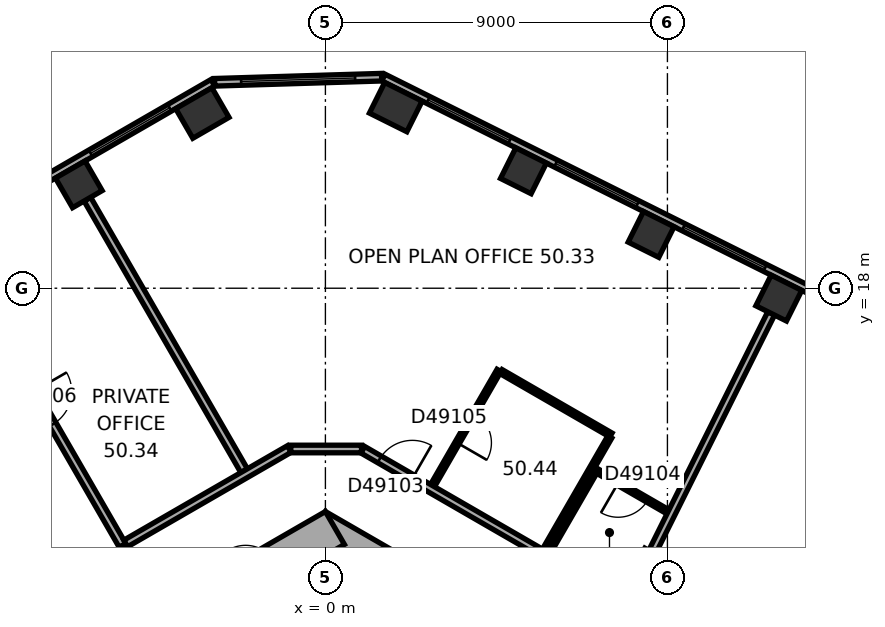
"""IFC4 building model, lengths in metres.
Left out: names, types, materials, properties, quantities, classifications, styles, units other than length and angle.
Written with IfcOpenShell. Run it as: python <this file> out.ifc"""

import sys

from ifc_helpers import new_model, si_unit, direction, frame, frame_2d, origin, origin_2d, place, context, subcontext, project, spatial, rectangle, extrude, element, fill, save


model = new_model("IFC4")
c1 = context("Model", 3, precision=1e-05, world=origin(), true_north=direction((0.0, 1.0)))
c2 = subcontext(c1, "Body", "Model", "MODEL_VIEW")
j1 = project(units=[si_unit("LENGTHUNIT", "METRE"), si_unit("PLANEANGLEUNIT", "RADIAN")], contexts=[c1])
p1 = place(None, origin())
s1 = spatial("IfcSite", under=j1, at=p1, CompositionType="ELEMENT")
p2 = place(p1, origin())
s2 = spatial("IfcBuilding", under=s1, at=p2, CompositionType="ELEMENT")
p3 = place(p2, frame((0.0, 0.0, 202.1)))
s3 = spatial("IfcBuildingStorey", under=s2, at=p3, CompositionType="ELEMENT", Elevation=202.1)
for number, where, z_axis, x_axis in (
    (1, (11.931, 17.74, 0.0), (0.0, 0.0, 1.0), (-0.895, 0.446, 0.0)),
    (2, (8.571, 19.416, 0.0), (0.0, 0.0, 1.0), (-0.895, 0.446, 0.0)),
    (3, (5.211, 21.091, 0.0), (0.0, 0.0, 1.0), (-0.895, 0.446, 0.0)),
):
    element("IfcColumn", number, at=place(p3, frame(where, z_axis=z_axis, x_axis=x_axis)), inside=s3, PredefinedType="COLUMN", context=c2, shape_type="SweptSolid", body=[
        extrude(rectangle(XDim=0.9, YDim=0.9, at=origin_2d()), origin(), (0.0, 0.0, 1.0), 3.7),
    ])
for number, where, z_axis, x_axis in (
    (4, (1.852, 22.766, 0.0), (0.0, 0.0, 1.0), (-0.895, 0.446, 0.0)),
    (5, (-3.238, 22.61, 0.0), (0.0, 0.0, 1.0), (-0.866, -0.5, 0.0)),
):
    element("IfcColumn", number, at=place(p3, frame(where, z_axis=z_axis, x_axis=x_axis)), inside=s3, PredefinedType="COLUMN", context=c2, shape_type="SweptSolid", body=[
        extrude(rectangle(XDim=1.1, YDim=0.9, at=origin_2d()), origin(), (0.0, 0.0, 1.0), 3.7),
    ])
p4 = place(p3, frame((-6.489, 20.733, 0.0), z_axis=(0.0, 0.0, 1.0), x_axis=(-0.866025403784, -0.5, 0.0)))
e6 = element("IfcColumn", 6, at=p4, inside=s3, PredefinedType="COLUMN", context=c2, shape_type="SweptSolid", body=[
    extrude(rectangle(XDim=0.9, YDim=0.9, at=origin_2d()), origin(), (0.0, 0.0, 1.0), 3.7),
])
p5 = place(p3, frame((10.25, 5.629, 0.0), z_axis=(0.0, 0.0, 1.0), x_axis=(-0.866022616891, 0.50000482701, 0.0)))
e7 = element("IfcWall", 7, at=p5, inside=s3, PredefinedType="SHEAR", context=c2, shape_type="SweptSolid", body=[
    extrude(rectangle(XDim=12.125, YDim=1.0, at=frame_2d((6.062, 0.0))), origin(), (0.0, 0.0, 1.0), 3.7),
])
p6 = place(p5, frame((5.312, 0.0, 0.0)))
e8 = element("IfcOpeningElement", 8, at=p6, cuts=e7, PredefinedType="OPENING", context=c2, shape_type="SweptSolid", body=[
    extrude(rectangle(XDim=0.9, YDim=2.1, at=frame_2d((0.45, 1.05))), frame((0.0, 0.51, 0.0), z_axis=(0.0, -1.0, 0.0), x_axis=(1.0, 0.0, 0.0)), (0.0, 0.0, 1.0), 1.02),
])
p7 = place(p3, frame((0.25, 11.691, 0.0), z_axis=(0.0, 0.0, 1.0), x_axis=(-0.866022616891, -0.50000482701, 0.0)))
e9 = element("IfcWall", 9, at=p7, inside=s3, PredefinedType="SHEAR", context=c2, shape_type="SweptSolid", body=[
    extrude(rectangle(XDim=12.125, YDim=1.0, at=frame_2d((6.062, 0.0))), origin(), (0.0, 0.0, 1.0), 3.7),
])
p8 = place(p7, frame((6.262, 0.0, 0.0)))
e10 = element("IfcOpeningElement", 10, at=p8, cuts=e9, PredefinedType="OPENING", context=c2, shape_type="SweptSolid", body=[
    extrude(rectangle(XDim=1.5, YDim=2.1, at=frame_2d((0.75, 1.05))), frame((0.0, 0.51, 0.0), z_axis=(0.0, -1.0, 0.0), x_axis=(1.0, 0.0, 0.0)), (0.0, 0.0, 1.0), 1.02),
])
p9 = place(p7, frame((1.812, 0.0, 0.0)))
e11 = element("IfcOpeningElement", 11, at=p9, cuts=e9, PredefinedType="OPENING", context=c2, shape_type="SweptSolid", body=[
    extrude(rectangle(XDim=0.9, YDim=2.1, at=frame_2d((0.45, 1.05))), frame((0.0, 0.51, 0.0), z_axis=(0.0, -1.0, 0.0), x_axis=(1.0, 0.0, 0.0)), (0.0, 0.0, 1.0), 1.02),
])
p10 = place(p7, frame((4.412, 0.0, 0.0)))
e12 = element("IfcOpeningElement", 12, at=p10, cuts=e9, PredefinedType="OPENING", context=c2, shape_type="SweptSolid", body=[
    extrude(rectangle(XDim=0.9, YDim=2.1, at=frame_2d((0.45, 1.05))), frame((0.0, 0.51, 0.0), z_axis=(0.0, -1.0, 0.0), x_axis=(1.0, 0.0, 0.0)), (0.0, 0.0, 1.0), 1.02),
])
p11 = place(p3, frame((19.464, 14.599, 0.0), z_axis=(0.0, 0.0, 1.0), x_axis=(-0.894935755043, 0.446195018289, 0.0)))
e13 = element("IfcWall", 13, at=p11, inside=s3, PredefinedType="STANDARD", context=c2, shape_type="SweptSolid", body=[
    extrude(rectangle(XDim=20.044, YDim=0.2, at=frame_2d((10.022, 0.0))), origin(), (0.0, 0.0, 1.0), 3.7),
])
p12 = place(p11, frame((1.313, 0.0, 0.9)))
e14 = element("IfcOpeningElement", 14, at=p12, cuts=e13, PredefinedType="OPENING", context=c2, shape_type="SweptSolid", body=[
    extrude(rectangle(XDim=2.4, YDim=2.0, at=frame_2d((1.2, 1.0))), frame((0.0, 0.11, 0.0), z_axis=(0.0, -1.0, 0.0), x_axis=(1.0, 0.0, 0.0)), (0.0, 0.0, 1.0), 0.22),
])
p13 = place(p11, frame((5.067, 0.0, 0.9)))
e15 = element("IfcOpeningElement", 15, at=p13, cuts=e13, PredefinedType="OPENING", context=c2, shape_type="SweptSolid", body=[
    extrude(rectangle(XDim=2.4, YDim=2.0, at=frame_2d((1.2, 1.0))), frame((0.0, 0.11, 0.0), z_axis=(0.0, -1.0, 0.0), x_axis=(1.0, 0.0, 0.0)), (0.0, 0.0, 1.0), 0.22),
])
p14 = place(p11, frame((8.821, 0.0, 0.9)))
e16 = element("IfcOpeningElement", 16, at=p14, cuts=e13, PredefinedType="OPENING", context=c2, shape_type="SweptSolid", body=[
    extrude(rectangle(XDim=2.4, YDim=2.0, at=frame_2d((1.2, 1.0))), frame((0.0, 0.11, 0.0), z_axis=(0.0, -1.0, 0.0), x_axis=(1.0, 0.0, 0.0)), (0.0, 0.0, 1.0), 0.22),
])
p15 = place(p11, frame((12.575, 0.0, 0.9)))
e17 = element("IfcOpeningElement", 17, at=p15, cuts=e13, PredefinedType="OPENING", context=c2, shape_type="SweptSolid", body=[
    extrude(rectangle(XDim=2.4, YDim=2.0, at=frame_2d((1.2, 1.0))), frame((0.0, 0.11, 0.0), z_axis=(0.0, -1.0, 0.0), x_axis=(1.0, 0.0, 0.0)), (0.0, 0.0, 1.0), 0.22),
])
p16 = place(p11, frame((16.329, 0.0, 0.9)))
e18 = element("IfcOpeningElement", 18, at=p16, cuts=e13, PredefinedType="OPENING", context=c2, shape_type="SweptSolid", body=[
    extrude(rectangle(XDim=2.4, YDim=2.0, at=frame_2d((1.2, 1.0))), frame((0.0, 0.11, 0.0), z_axis=(0.0, -1.0, 0.0), x_axis=(1.0, 0.0, 0.0)), (0.0, 0.0, 1.0), 0.22),
])
p17 = place(p3, frame((1.479, 23.553, 0.0), z_axis=(0.0, 0.0, 1.0), x_axis=(-0.999534786117, -0.03049936625, 0.0)))
e19 = element("IfcWall", 19, at=p17, inside=s3, PredefinedType="STANDARD", context=c2, shape_type="SweptSolid", body=[
    extrude(rectangle(XDim=4.395, YDim=0.2, at=frame_2d((2.197, 0.0))), origin(), (0.0, 0.0, 1.0), 3.7),
])
p18 = place(p17, frame((0.698, 0.0, 0.9)))
e20 = element("IfcOpeningElement", 20, at=p18, cuts=e19, PredefinedType="OPENING", context=c2, shape_type="SweptSolid", body=[
    extrude(rectangle(XDim=3.0, YDim=2.0, at=frame_2d((1.5, 1.0))), frame((0.0, 0.11, 0.0), z_axis=(0.0, -1.0, 0.0), x_axis=(1.0, 0.0, 0.0)), (0.0, 0.0, 1.0), 0.22),
])
p19 = place(p3, frame((-2.961, 23.405, 0.0), z_axis=(0.0, 0.0, 1.0), x_axis=(-0.866023315909, -0.500003616288, 0.0)))
e21 = element("IfcWall", 21, at=p19, inside=s3, PredefinedType="STANDARD", context=c2, shape_type="SweptSolid", body=[
    extrude(rectangle(XDim=20.044, YDim=0.2, at=frame_2d((10.022, 0.0))), origin(), (0.0, 0.0, 1.0), 3.7),
])
p20 = place(p19, frame((1.314, 0.0, 0.9)))
e22 = element("IfcOpeningElement", 22, at=p20, cuts=e21, PredefinedType="OPENING", context=c2, shape_type="SweptSolid", body=[
    extrude(rectangle(XDim=2.4, YDim=2.0, at=frame_2d((1.2, 1.0))), frame((0.0, 0.11, 0.0), z_axis=(0.0, -1.0, 0.0), x_axis=(1.0, 0.0, 0.0)), (0.0, 0.0, 1.0), 0.22),
])
p21 = place(p19, frame((5.069, 0.0, 0.9)))
e23 = element("IfcOpeningElement", 23, at=p21, cuts=e21, PredefinedType="OPENING", context=c2, shape_type="SweptSolid", body=[
    extrude(rectangle(XDim=2.4, YDim=2.0, at=frame_2d((1.2, 1.0))), frame((0.0, 0.11, 0.0), z_axis=(0.0, -1.0, 0.0), x_axis=(1.0, 0.0, 0.0)), (0.0, 0.0, 1.0), 0.22),
])
p22 = place(p19, frame((8.823, 0.0, 0.9)))
e24 = element("IfcOpeningElement", 24, at=p22, cuts=e21, PredefinedType="OPENING", context=c2, shape_type="SweptSolid", body=[
    extrude(rectangle(XDim=2.4, YDim=2.0, at=frame_2d((1.2, 1.0))), frame((0.0, 0.11, 0.0), z_axis=(0.0, -1.0, 0.0), x_axis=(1.0, 0.0, 0.0)), (0.0, 0.0, 1.0), 0.22),
])
p23 = place(p19, frame((12.577, 0.0, 0.9)))
e25 = element("IfcOpeningElement", 25, at=p23, cuts=e21, PredefinedType="OPENING", context=c2, shape_type="SweptSolid", body=[
    extrude(rectangle(XDim=2.4, YDim=2.0, at=frame_2d((1.2, 1.0))), frame((0.0, 0.11, 0.0), z_axis=(0.0, -1.0, 0.0), x_axis=(1.0, 0.0, 0.0)), (0.0, 0.0, 1.0), 0.22),
])
p24 = place(p19, frame((16.331, 0.0, 0.9)))
e26 = element("IfcOpeningElement", 26, at=p24, cuts=e21, PredefinedType="OPENING", context=c2, shape_type="SweptSolid", body=[
    extrude(rectangle(XDim=2.4, YDim=2.0, at=frame_2d((1.2, 1.0))), frame((0.0, 0.11, 0.0), z_axis=(0.0, -1.0, 0.0), x_axis=(1.0, 0.0, 0.0)), (0.0, 0.0, 1.0), 0.22),
])
p25 = place(p3, frame((-9.515, 18.466, 0.0), z_axis=(0.0, 0.0, 1.0), x_axis=(0.500010139422, -0.866019549707, 0.0)))
e27 = element("IfcWall", 27, at=p25, inside=s3, PredefinedType="PARTITIONING", context=c2, shape_type="SweptSolid", body=[
    extrude(rectangle(XDim=8.35, YDim=0.2, at=frame_2d((4.175, 0.0))), origin(), (0.0, 0.0, 1.0), 2.55),
])
p26 = place(p25, frame((3.675, 0.0, 0.0)))
e28 = element("IfcOpeningElement", 28, at=p26, cuts=e27, PredefinedType="OPENING", context=c2, shape_type="SweptSolid", body=[
    extrude(rectangle(XDim=1.0, YDim=2.1, at=frame_2d((0.5, 1.05))), frame((0.0, 0.11, 0.0), z_axis=(0.0, -1.0, 0.0), x_axis=(1.0, 0.0, 0.0)), (0.0, 0.0, 1.0), 0.22),
])
p27 = place(p3, frame((-6.264, 20.344, 0.0), z_axis=(0.0, 0.0, 1.0), x_axis=(0.499996545922, -0.866027397988, 0.0)))
e29 = element("IfcWall", 29, at=p27, inside=s3, PredefinedType="PARTITIONING", context=c2, shape_type="SweptSolid", body=[
    extrude(rectangle(XDim=8.25, YDim=0.2, at=frame_2d((4.125, 0.0))), origin(), (0.0, 0.0, 1.0), 3.35),
])
p28 = place(p3, frame((-0.95, 13.77, 0.0), z_axis=(0.0, 0.0, 1.0), x_axis=(-0.866036689987, -0.499980451214, 0.0)))
e30 = element("IfcWall", 30, at=p28, inside=s3, PredefinedType="PARTITIONING", context=c2, shape_type="SweptSolid", body=[
    extrude(rectangle(XDim=4.969, YDim=0.2, at=frame_2d((2.485, 0.0))), origin(), (0.0, 0.0, 1.0), 3.35),
])
p29 = place(p3, frame((0.95, 13.77, 0.0), z_axis=(0.0, 0.0, 1.0), x_axis=(-1.0, 0.0, 0.0)))
e31 = element("IfcWall", 31, at=p29, inside=s3, PredefinedType="PARTITIONING", context=c2, shape_type="SweptSolid", body=[
    extrude(rectangle(XDim=1.86, YDim=0.2, at=frame_2d((0.93, 0.0))), origin(), (0.0, 0.0, 1.0), 3.35),
])
p30 = place(p3, frame((2.819, 12.806, 0.0), z_axis=(0.0, 0.0, 1.0), x_axis=(0.500010275428, 0.866019471182, 0.0)))
e32 = element("IfcWall", 32, at=p30, inside=s3, PredefinedType="PARTITIONING", context=c2, shape_type="SweptSolid", body=[
    extrude(rectangle(XDim=3.5, YDim=0.12, at=frame_2d((1.75, 0.0))), origin(), (0.0, 0.0, 1.0), 3.35),
])
p31 = place(p30, frame((1.3, 0.0, 0.0)))
e33 = element("IfcOpeningElement", 33, at=p31, cuts=e32, PredefinedType="OPENING", context=c2, shape_type="SweptSolid", body=[
    extrude(rectangle(XDim=0.9, YDim=2.1, at=frame_2d((0.45, 1.05))), frame((0.0, 0.07, 0.0), z_axis=(0.0, -1.0, 0.0), x_axis=(1.0, 0.0, 0.0)), (0.0, 0.0, 1.0), 0.14),
])
p32 = place(p3, frame((4.621, 15.807, 0.0), z_axis=(0.0, 0.0, 1.0), x_axis=(0.866039519639, -0.499975549825, 0.0)))
e34 = element("IfcWall", 34, at=p32, inside=s3, PredefinedType="PARTITIONING", context=c2, shape_type="SweptSolid", body=[
    extrude(rectangle(XDim=3.34, YDim=0.12, at=frame_2d((1.67, 0.0))), origin(), (0.0, 0.0, 1.0), 3.35),
])
p33 = place(p3, frame((5.713, 11.02, 0.0), z_axis=(0.0, 0.0, 1.0), x_axis=(-0.866038905227, 0.499976614087, 0.0)))
e35 = element("IfcWall", 35, at=p33, inside=s3, PredefinedType="PARTITIONING", context=c2, shape_type="SweptSolid", body=[
    extrude(rectangle(XDim=5.46, YDim=0.2, at=frame_2d((2.73, 0.0))), origin(), (0.0, 0.0, 1.0), 3.35),
])
p34 = place(p33, frame((3.955, 0.0, 0.0)))
e36 = element("IfcOpeningElement", 36, at=p34, cuts=e35, PredefinedType="OPENING", context=c2, shape_type="SweptSolid", body=[
    extrude(rectangle(XDim=1.0, YDim=2.1, at=frame_2d((0.5, 1.05))), frame((0.0, 0.11, 0.0), z_axis=(0.0, -1.0, 0.0), x_axis=(1.0, 0.0, 0.0)), (0.0, 0.0, 1.0), 0.22),
])
p35 = place(p3, frame((5.867, 11.046, 0.0), z_axis=(0.0, 0.0, 1.0), x_axis=(0.500004234368, 0.866022959057, 0.0)))
e37 = element("IfcWall", 37, at=p35, inside=s3, PredefinedType="PARTITIONING", context=c2, shape_type="SweptSolid", body=[
    extrude(rectangle(XDim=2.5, YDim=0.12, at=frame_2d((1.25, 0.0))), origin(), (0.0, 0.0, 1.0), 3.35),
])
p36 = place(p3, frame((7.169, 13.181, 0.0), z_axis=(0.0, 0.0, 1.0), x_axis=(0.866048165231, -0.499960573946, 0.0)))
e38 = element("IfcWall", 38, at=p36, inside=s3, PredefinedType="PARTITIONING", context=c2, shape_type="SweptSolid", body=[
    extrude(rectangle(XDim=2.13, YDim=0.12, at=frame_2d((1.065, 0.0))), origin(), (0.0, 0.0, 1.0), 3.35),
])
p37 = place(p36, frame((0.615, 0.0, 0.0)))
e39 = element("IfcOpeningElement", 39, at=p37, cuts=e38, PredefinedType="OPENING", context=c2, shape_type="SweptSolid", body=[
    extrude(rectangle(XDim=0.9, YDim=2.1, at=frame_2d((0.45, 1.05))), frame((0.0, 0.07, 0.0), z_axis=(0.0, -1.0, 0.0), x_axis=(1.0, 0.0, 0.0)), (0.0, 0.0, 1.0), 0.14),
])
p38 = place(p3, frame((7.483, 14.085, 0.0), z_axis=(0.0, 0.0, 1.0), x_axis=(-0.499978425106, -0.866037859697, 0.0)))
e40 = element("IfcWall", 40, at=p38, inside=s3, PredefinedType="PARTITIONING", context=c2, shape_type="SweptSolid", body=[
    extrude(rectangle(XDim=3.44, YDim=0.12, at=frame_2d((1.72, 0.0))), origin(), (0.0, 0.0, 1.0), 3.35),
])
p39 = place(p3, frame((11.73, 17.338, 0.0), z_axis=(0.0, 0.0, 1.0), x_axis=(-0.446189718314, -0.894938397473, 0.0)))
e41 = element("IfcWall", 41, at=p39, inside=s3, PredefinedType="PARTITIONING", context=c2, shape_type="SweptSolid", body=[
    extrude(rectangle(XDim=8.396, YDim=0.2, at=frame_2d((4.198, 0.0))), origin(), (0.0, 0.0, 1.0), 2.55),
])
p40 = place(p14, origin())
e42 = element("IfcWindow", 42, at=p40, inside=s3, PartitioningType="SINGLE_PANEL", PredefinedType="WINDOW", context=c2, shape_type="SweptSolid", body=[
    extrude(rectangle(XDim=2.4, YDim=2.0, at=frame_2d((1.2, 1.0))), frame((0.0, 0.03, 0.0), z_axis=(0.0, -1.0, 0.0), x_axis=(1.0, 0.0, 0.0)), (0.0, 0.0, 1.0), 0.06),
])
fill(e16, e42)
p41 = place(p15, origin())
e43 = element("IfcWindow", 43, at=p41, inside=s3, PartitioningType="SINGLE_PANEL", PredefinedType="WINDOW", context=c2, shape_type="SweptSolid", body=[
    extrude(rectangle(XDim=2.4, YDim=2.0, at=frame_2d((1.2, 1.0))), frame((0.0, 0.03, 0.0), z_axis=(0.0, -1.0, 0.0), x_axis=(1.0, 0.0, 0.0)), (0.0, 0.0, 1.0), 0.06),
])
fill(e17, e43)
p42 = place(p16, origin())
e44 = element("IfcWindow", 44, at=p42, inside=s3, PartitioningType="SINGLE_PANEL", PredefinedType="WINDOW", context=c2, shape_type="SweptSolid", body=[
    extrude(rectangle(XDim=2.4, YDim=2.0, at=frame_2d((1.2, 1.0))), frame((0.0, 0.03, 0.0), z_axis=(0.0, -1.0, 0.0), x_axis=(1.0, 0.0, 0.0)), (0.0, 0.0, 1.0), 0.06),
])
fill(e18, e44)
p43 = place(p18, origin())
e45 = element("IfcWindow", 45, at=p43, inside=s3, PartitioningType="SINGLE_PANEL", PredefinedType="WINDOW", context=c2, shape_type="SweptSolid", body=[
    extrude(rectangle(XDim=3.0, YDim=2.0, at=frame_2d((1.5, 1.0))), frame((0.0, 0.03, 0.0), z_axis=(0.0, -1.0, 0.0), x_axis=(1.0, 0.0, 0.0)), (0.0, 0.0, 1.0), 0.06),
])
fill(e20, e45)
p44 = place(p20, origin())
e46 = element("IfcWindow", 46, at=p44, inside=s3, PartitioningType="SINGLE_PANEL", PredefinedType="WINDOW", context=c2, shape_type="SweptSolid", body=[
    extrude(rectangle(XDim=2.4, YDim=2.0, at=frame_2d((1.2, 1.0))), frame((0.0, 0.03, 0.0), z_axis=(0.0, -1.0, 0.0), x_axis=(1.0, 0.0, 0.0)), (0.0, 0.0, 1.0), 0.06),
])
fill(e22, e46)
p45 = place(p34, origin())
e47 = element("IfcDoor", 47, at=p45, inside=s3, OperationType="SINGLE_SWING_LEFT", PredefinedType="DOOR", context=c2, shape_type="SweptSolid", body=[
    extrude(rectangle(XDim=1.0, YDim=2.1, at=frame_2d((0.5, 1.05))), frame((0.0, 0.025, 0.0), z_axis=(0.0, -1.0, 0.0), x_axis=(1.0, 0.0, 0.0)), (0.0, 0.0, 1.0), 0.05),
])
fill(e36, e47)
p46 = place(p37, origin())
e48 = element("IfcDoor", 48, at=p46, inside=s3, OperationType="SINGLE_SWING_LEFT", PredefinedType="DOOR", context=c2, shape_type="SweptSolid", body=[
    extrude(rectangle(XDim=0.9, YDim=2.1, at=frame_2d((0.45, 1.05))), frame((0.0, 0.025, 0.0), z_axis=(0.0, -1.0, 0.0), x_axis=(1.0, 0.0, 0.0)), (0.0, 0.0, 1.0), 0.05),
])
fill(e39, e48)
p47 = place(p31, origin())
e49 = element("IfcDoor", 49, at=p47, inside=s3, OperationType="SINGLE_SWING_LEFT", PredefinedType="DOOR", context=c2, shape_type="SweptSolid", body=[
    extrude(rectangle(XDim=0.9, YDim=2.1, at=frame_2d((0.45, 1.05))), frame((0.0, 0.025, 0.0), z_axis=(0.0, -1.0, 0.0), x_axis=(1.0, 0.0, 0.0)), (0.0, 0.0, 1.0), 0.05),
])
fill(e33, e49)
p48 = place(p26, origin())
e50 = element("IfcDoor", 50, at=p48, inside=s3, OperationType="SINGLE_SWING_LEFT", PredefinedType="DOOR", context=c2, shape_type="SweptSolid", body=[
    extrude(rectangle(XDim=1.0, YDim=2.1, at=frame_2d((0.5, 1.05))), frame((0.0, 0.025, 0.0), z_axis=(0.0, -1.0, 0.0), x_axis=(1.0, 0.0, 0.0)), (0.0, 0.0, 1.0), 0.05),
])
fill(e28, e50)
save(model, sys.argv[1])
